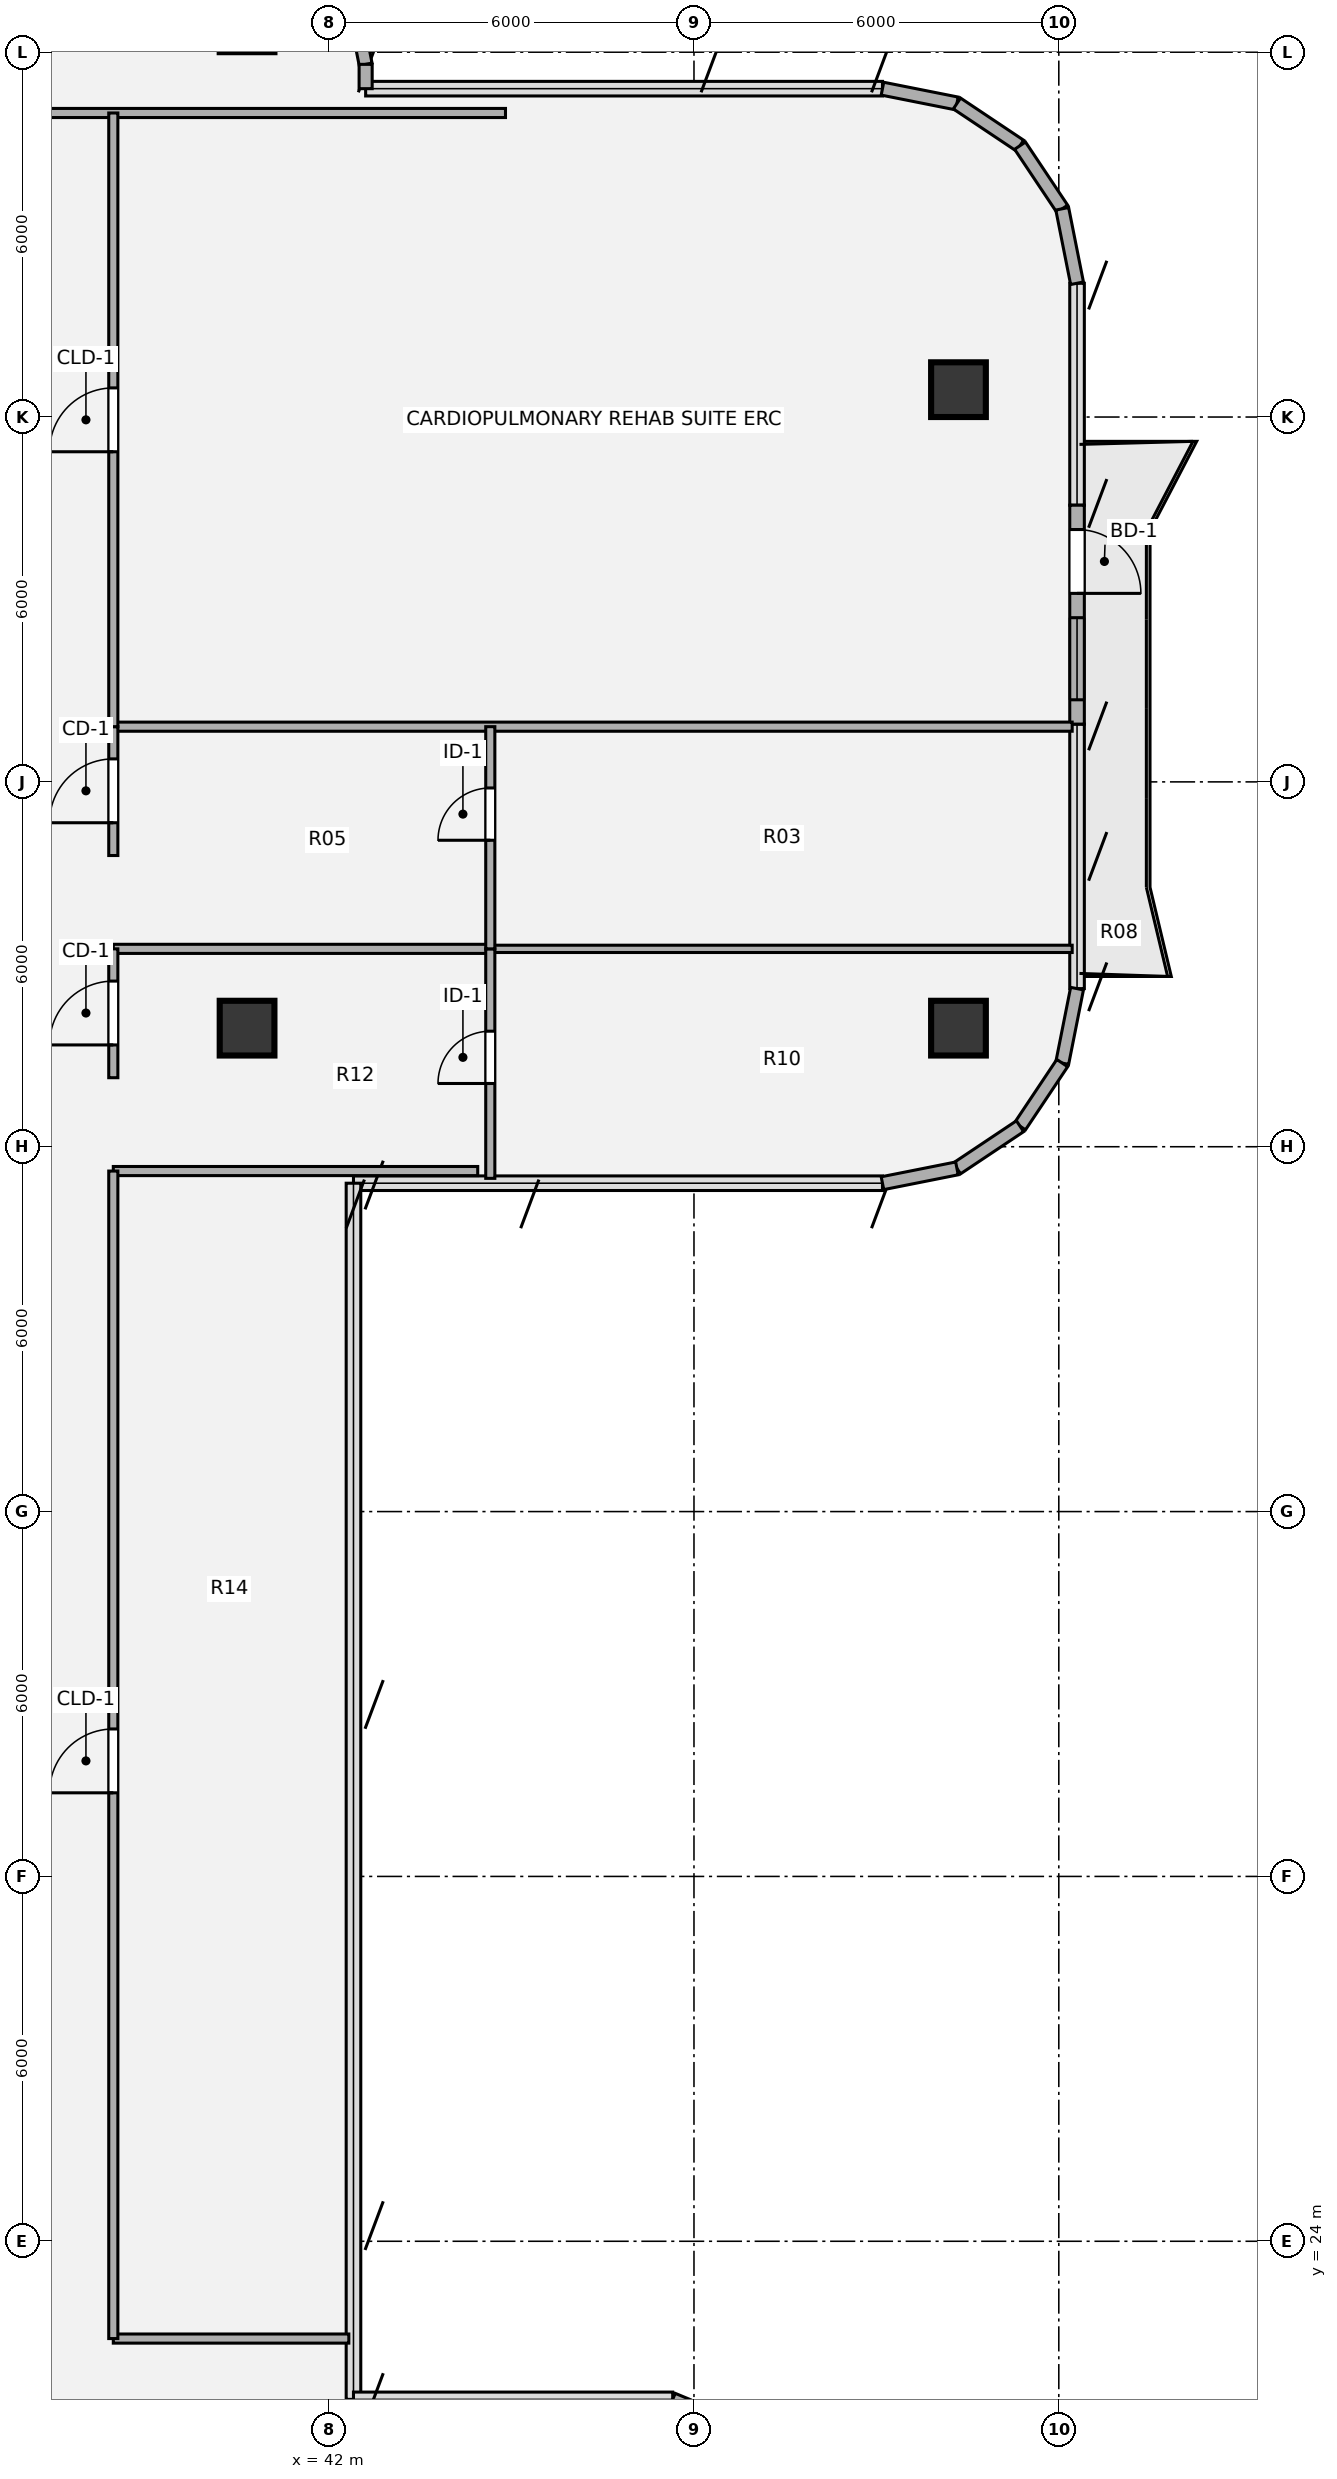
"""IFC4 building model, lengths in metres.
Left out: names, types, materials, properties, quantities, classifications, styles, units other than length and angle.
Written with IfcOpenShell. Run it as: python <this file> out.ifc"""

import sys

from ifc_helpers import new_model, si_unit, direction, frame, frame_2d, origin, origin_2d, place, context, subcontext, project, spatial, rectangle, hollow_circle, extrude, source, transform, mapped, element, fill, save


model = new_model("IFC4")
c1 = context("Model", 3, precision=1e-05, world=origin(), true_north=direction((0.0, 1.0)))
c2 = subcontext(c1, "Body", "Model", "MODEL_VIEW")
j1 = project(units=[si_unit("LENGTHUNIT", "METRE"), si_unit("PLANEANGLEUNIT", "RADIAN")], contexts=[c1])
p1 = place(None, origin())
s1 = spatial("IfcSite", under=j1, at=p1, CompositionType="ELEMENT")
p2 = place(p1, origin())
s2 = spatial("IfcBuilding", under=s1, at=p2, CompositionType="ELEMENT")
p3 = place(p2, frame((0.0, 0.0, 245.7)))
s3 = spatial("IfcBuildingStorey", under=s2, at=p3, CompositionType="ELEMENT", Elevation=245.7)
m1 = source(origin(), c2, "Body", "SweptSolid", [
    extrude(hollow_circle(Radius=0.45, WallThickness=0.032, at=origin_2d()), origin(), (0.0, 0.0, 1.0), 3.78),
])
for number, where, z_axis, x_axis in (
    (1, (52.35, 43.95, 0.0), (0.0, 0.0, 1.0), (1.0, 0.0, 0.0)),
    (2, (52.35, 54.45, 0.0), (0.0, 0.0, 1.0), (1.0, 0.0, 0.0)),
    (3, (40.65, 43.95, 0.0), (0.0, 0.0, 1.0), (1.0, 0.0, 0.0)),
):
    element("IfcColumn", number, at=place(p3, frame(where, z_axis=z_axis, x_axis=x_axis)), inside=s3, PredefinedType="COLUMN", context=c2, shape_type="MappedRepresentation", body=[
        mapped(m1, transform((0.0, 0.0, 0.0), x_axis=(1.0, 0.0, 0.0), y_axis=(0.0, 1.0, 0.0), z_axis=(0.0, 0.0, 1.0), scale=1.0)),
    ])
p4 = place(p3, frame((42.402, 60.795, 0.0), z_axis=(0.0, 0.0, 1.0), x_axis=(0.195190360752, -0.980765376158, 0.0)))
e4 = element("IfcWall", 4, at=p4, inside=s3, PredefinedType="SOLIDWALL", context=c2, shape_type="SweptSolid", body=[
    extrude(rectangle(XDim=1.014, YDim=0.215, at=frame_2d((0.507, 0.0))), origin(), (0.0, 0.0, 1.0), 3.53),
])
p5 = place(p3, frame((42.6, 59.8, 0.0), z_axis=(0.0, 0.0, 1.0), x_axis=(0.0, -1.0, 0.0)))
e5 = element("IfcWall", 5, at=p5, inside=s3, PredefinedType="SOLIDWALL", context=c2, shape_type="SweptSolid", body=[
    extrude(rectangle(XDim=0.4, YDim=0.215, at=frame_2d((0.2, 0.0))), origin(), (0.0, 0.0, 1.0), 3.53),
])
for number, where, z_axis, x_axis in (
    (6, (51.1, 59.4, 0.0), (0.0, 0.0, 1.0), (0.981, -0.195, 0.0)),
    (7, (52.325, 59.156, 0.0), (0.0, 0.0, 1.0), (0.831, -0.556, 0.0)),
    (8, (53.363, 58.463, 0.0), (0.0, 0.0, 1.0), (0.556, -0.831, 0.0)),
    (9, (54.056, 57.425, 0.0), (0.0, 0.0, 1.0), (0.195, -0.981, 0.0)),
):
    element("IfcWall", number, at=place(p3, frame(where, z_axis=z_axis, x_axis=x_axis)), inside=s3, PredefinedType="SOLIDWALL", context=c2, shape_type="SweptSolid", body=[
        extrude(rectangle(XDim=1.249, YDim=0.215, at=frame_2d((0.624, 0.0))), origin(), (0.0, 0.0, 1.0), 3.53),
    ])
p6 = place(p3, frame((54.3, 52.55, 0.0), z_axis=(0.0, 0.0, 1.0), x_axis=(0.0, -1.0, 0.0)))
e10 = element("IfcWall", 10, at=p6, inside=s3, PredefinedType="SOLIDWALL", context=c2, shape_type="SweptSolid", body=[
    extrude(rectangle(XDim=3.6, YDim=0.24, at=frame_2d((1.8, 0.0))), origin(), (0.0, 0.0, 1.0), 3.53),
])
p7 = place(p6, frame((0.4, 0.0, 0.0)))
e11 = element("IfcOpeningElement", 11, at=p7, cuts=e10, PredefinedType="OPENING", context=c2, shape_type="SweptSolid", body=[
    extrude(rectangle(XDim=1.05, YDim=2.15, at=origin_2d()), frame((0.525, 0.13, 1.075), z_axis=(0.0, -1.0, 0.0), x_axis=(1.0, 0.0, 0.0)), (0.0, 0.0, 1.0), 0.26),
])
p8 = place(p6, frame((1.85, 0.0, 0.85)))
e12 = element("IfcOpeningElement", 12, at=p8, cuts=e10, PredefinedType="OPENING", context=c2, shape_type="SweptSolid", body=[
    extrude(rectangle(XDim=1.35, YDim=1.35, at=origin_2d()), frame((0.675, 0.13, 0.675), z_axis=(0.0, -1.0, 0.0), x_axis=(1.0, 0.0, 0.0)), (0.0, 0.0, 1.0), 0.26),
])
for number, where, z_axis, x_axis in (
    (13, (54.3, 44.6, 0.0), (0.0, 0.0, 1.0), (-0.195, -0.981, 0.0)),
    (14, (54.056, 43.375, 0.0), (0.0, 0.0, 1.0), (-0.556, -0.831, 0.0)),
    (15, (53.363, 42.337, 0.0), (0.0, 0.0, 1.0), (-0.831, -0.556, 0.0)),
    (16, (52.325, 41.644, 0.0), (0.0, 0.0, 1.0), (-0.981, -0.195, 0.0)),
):
    element("IfcWall", number, at=place(p3, frame(where, z_axis=z_axis, x_axis=x_axis)), inside=s3, PredefinedType="SOLIDWALL", context=c2, shape_type="SweptSolid", body=[
        extrude(rectangle(XDim=1.249, YDim=0.215, at=frame_2d((0.624, 0.0))), origin(), (0.0, 0.0, 1.0), 3.53),
    ])
p9 = place(p3, frame((47.65, 21.4, 0.0), z_axis=(0.0, 0.0, 1.0), x_axis=(0.924205486139, -0.381895560841, 0.0)))
e17 = element("IfcWall", 17, at=p9, inside=s3, PredefinedType="SOLIDWALL", context=c2, shape_type="SweptSolid", body=[
    extrude(rectangle(XDim=0.268, YDim=0.215, at=frame_2d((0.134, 0.0))), origin(), (0.0, 0.0, 1.0), 3.53),
])
p10 = place(p3, frame((38.45, 22.4, 0.0), z_axis=(0.0, 0.0, 1.0), x_axis=(1.0, 0.0, 0.0)))
e18 = element("IfcWall", 18, at=p10, inside=s3, PredefinedType="PARTITIONING", context=c2, shape_type="SweptSolid", body=[
    extrude(rectangle(XDim=3.873, YDim=0.15, at=frame_2d((1.937, 0.0))), origin(), (0.0, 0.0, 1.0), 3.5),
])
p11 = place(p3, frame((38.45, 41.6, 0.0), z_axis=(0.0, 0.0, 1.0), x_axis=(1.0, 0.0, 0.0)))
e19 = element("IfcWall", 19, at=p11, inside=s3, PredefinedType="PARTITIONING", context=c2, shape_type="SweptSolid", body=[
    extrude(rectangle(XDim=5.993, YDim=0.15, at=frame_2d((2.997, 0.0))), origin(), (0.0, 0.0, 1.0), 3.5),
])
p12 = place(p3, frame((38.45, 45.254, 0.0), z_axis=(0.0, 0.0, 1.0), x_axis=(1.0, 0.0, 0.0)))
e20 = element("IfcWall", 20, at=p12, inside=s3, PredefinedType="PARTITIONING", context=c2, shape_type="SweptSolid", body=[
    extrude(rectangle(XDim=6.2, YDim=0.15, at=frame_2d((3.1, 0.0))), origin(), (0.0, 0.0, 1.0), 2.982),
])
p13 = place(p3, frame((44.65, 45.254, 0.0), z_axis=(0.0, 0.0, 1.0), x_axis=(1.0, 0.0, 0.0)))
e21 = element("IfcWall", 21, at=p13, inside=s3, PredefinedType="PARTITIONING", context=c2, shape_type="SweptSolid", body=[
    extrude(rectangle(XDim=9.57, YDim=0.12, at=frame_2d((4.785, 0.0))), origin(), (0.0, 0.0, 1.0), 2.982),
])
p14 = place(p3, frame((38.45, 48.908, 0.0), z_axis=(0.0, 0.0, 1.0), x_axis=(1.0, 0.0, 0.0)))
e22 = element("IfcWall", 22, at=p14, inside=s3, PredefinedType="PARTITIONING", context=c2, shape_type="SweptSolid", body=[
    extrude(rectangle(XDim=15.77, YDim=0.15, at=frame_2d((7.885, 0.0))), origin(), (0.0, 0.0, 1.0), 2.982),
])
p15 = place(p3, frame((27.1, 59.0, 0.0), z_axis=(0.0, 0.0, 1.0), x_axis=(1.0, 0.0, 0.0)))
e23 = element("IfcWall", 23, at=p15, inside=s3, PredefinedType="PARTITIONING", context=c2, shape_type="SweptSolid", body=[
    extrude(rectangle(XDim=17.8, YDim=0.15, at=frame_2d((8.9, 0.0))), origin(), (0.0, 0.0, 1.0), 3.308),
])
p16 = place(p15, frame((8.375, 0.0, 0.0)))
e24 = element("IfcOpeningElement", 24, at=p16, cuts=e23, PredefinedType="OPENING", context=c2, shape_type="SweptSolid", body=[
    extrude(rectangle(XDim=1.05, YDim=2.1, at=origin_2d()), frame((0.525, 0.085, 1.05), z_axis=(0.0, -1.0, 0.0), x_axis=(1.0, 0.0, 0.0)), (0.0, 0.0, 1.0), 0.17),
])
p17 = place(p3, frame((38.45, 22.4, 0.0), z_axis=(0.0, 0.0, 1.0), x_axis=(0.0, 1.0, 0.0)))
e25 = element("IfcWall", 25, at=p17, inside=s3, PredefinedType="PARTITIONING", context=c2, shape_type="SweptSolid", body=[
    extrude(rectangle(XDim=19.2, YDim=0.15, at=frame_2d((9.6, 0.0))), origin(), (0.0, 0.0, 1.0), 3.5),
])
p18 = place(p17, frame((8.975, 0.0, 0.0)))
e26 = element("IfcOpeningElement", 26, at=p18, cuts=e25, PredefinedType="OPENING", context=c2, shape_type="SweptSolid", body=[
    extrude(rectangle(XDim=1.05, YDim=2.1, at=origin_2d()), frame((0.525, 0.085, 1.05), z_axis=(0.0, -1.0, 0.0), x_axis=(1.0, 0.0, 0.0)), (0.0, 0.0, 1.0), 0.17),
])
p19 = place(p3, frame((38.45, 43.135, 0.0), z_axis=(0.0, 0.0, 1.0), x_axis=(0.0, 1.0, 0.0)))
e27 = element("IfcWall", 27, at=p19, inside=s3, PredefinedType="PARTITIONING", context=c2, shape_type="SweptSolid", body=[
    extrude(rectangle(XDim=2.119, YDim=0.15, at=frame_2d((1.06, 0.0))), origin(), (0.0, 0.0, 1.0), 3.5),
])
p20 = place(p19, frame((0.539, 0.0, 0.0)))
e28 = element("IfcOpeningElement", 28, at=p20, cuts=e27, PredefinedType="OPENING", context=c2, shape_type="SweptSolid", body=[
    extrude(rectangle(XDim=1.05, YDim=2.1, at=origin_2d()), frame((0.525, 0.085, 1.05), z_axis=(0.0, -1.0, 0.0), x_axis=(1.0, 0.0, 0.0)), (0.0, 0.0, 1.0), 0.17),
])
p21 = place(p3, frame((38.45, 46.789, 0.0), z_axis=(0.0, 0.0, 1.0), x_axis=(0.0, 1.0, 0.0)))
e29 = element("IfcWall", 29, at=p21, inside=s3, PredefinedType="PARTITIONING", context=c2, shape_type="SweptSolid", body=[
    extrude(rectangle(XDim=2.119, YDim=0.15, at=frame_2d((1.06, 0.0))), origin(), (0.0, 0.0, 1.0), 3.5),
])
p22 = place(p21, frame((0.539, 0.0, 0.0)))
e30 = element("IfcOpeningElement", 30, at=p22, cuts=e29, PredefinedType="OPENING", context=c2, shape_type="SweptSolid", body=[
    extrude(rectangle(XDim=1.05, YDim=2.1, at=origin_2d()), frame((0.525, 0.085, 1.05), z_axis=(0.0, -1.0, 0.0), x_axis=(1.0, 0.0, 0.0)), (0.0, 0.0, 1.0), 0.17),
])
p23 = place(p3, frame((38.45, 48.908, 0.0), z_axis=(0.0, 0.0, 1.0), x_axis=(0.0, 1.0, 0.0)))
e31 = element("IfcWall", 31, at=p23, inside=s3, PredefinedType="PARTITIONING", context=c2, shape_type="SweptSolid", body=[
    extrude(rectangle(XDim=10.092, YDim=0.15, at=frame_2d((5.046, 0.0))), origin(), (0.0, 0.0, 1.0), 3.5),
])
p24 = place(p23, frame((4.521, 0.0, 0.0)))
e32 = element("IfcOpeningElement", 32, at=p24, cuts=e31, PredefinedType="OPENING", context=c2, shape_type="SweptSolid", body=[
    extrude(rectangle(XDim=1.05, YDim=2.1, at=origin_2d()), frame((0.525, 0.085, 1.05), z_axis=(0.0, -1.0, 0.0), x_axis=(1.0, 0.0, 0.0)), (0.0, 0.0, 1.0), 0.17),
])
p25 = place(p3, frame((44.65, 41.48, 0.0), z_axis=(0.0, 0.0, 1.0), x_axis=(0.0, 1.0, 0.0)))
e33 = element("IfcWall", 33, at=p25, inside=s3, PredefinedType="PARTITIONING", context=c2, shape_type="SweptSolid", body=[
    extrude(rectangle(XDim=3.774, YDim=0.15, at=frame_2d((1.887, 0.0))), origin(), (0.0, 0.0, 1.0), 3.5),
])
p26 = place(p25, frame((1.56, 0.0, 0.0)))
e34 = element("IfcOpeningElement", 34, at=p26, cuts=e33, PredefinedType="OPENING", context=c2, shape_type="SweptSolid", body=[
    extrude(rectangle(XDim=0.86, YDim=2.1, at=origin_2d()), frame((0.43, 0.085, 1.05), z_axis=(0.0, -1.0, 0.0), x_axis=(1.0, 0.0, 0.0)), (0.0, 0.0, 1.0), 0.17),
])
p27 = place(p3, frame((44.65, 45.254, 0.0), z_axis=(0.0, 0.0, 1.0), x_axis=(0.0, 1.0, 0.0)))
e35 = element("IfcWall", 35, at=p27, inside=s3, PredefinedType="PARTITIONING", context=c2, shape_type="SweptSolid", body=[
    extrude(rectangle(XDim=3.654, YDim=0.15, at=frame_2d((1.827, 0.0))), origin(), (0.0, 0.0, 1.0), 3.5),
])
p28 = place(p27, frame((1.786, 0.0, 0.0)))
e36 = element("IfcOpeningElement", 36, at=p28, cuts=e35, PredefinedType="OPENING", context=c2, shape_type="SweptSolid", body=[
    extrude(rectangle(XDim=0.86, YDim=2.1, at=origin_2d()), frame((0.43, 0.085, 1.05), z_axis=(0.0, -1.0, 0.0), x_axis=(1.0, 0.0, 0.0)), (0.0, 0.0, 1.0), 0.17),
])
m2 = source(origin(), c2, "Body", "SweptSolid", [
    extrude(rectangle(XDim=1.05, YDim=2.15, at=origin_2d()), frame((0.525, 0.025, 1.075), z_axis=(0.0, -1.0, 0.0), x_axis=(1.0, 0.0, 0.0)), (0.0, 0.0, 1.0), 0.05),
])
p29 = place(p7, origin())
e37 = element("IfcDoor", 37, at=p29, inside=s3, OperationType="SINGLE_SWING_RIGHT", PredefinedType="DOOR", context=c2, shape_type="MappedRepresentation", body=[
    mapped(m2, transform((0.0, 0.0, 0.0), x_axis=(1.0, 0.0, 0.0), y_axis=(0.0, 1.0, 0.0), z_axis=(0.0, 0.0, 1.0), scale=1.0)),
])
fill(e11, e37)
m3 = source(origin(), c2, "Body", "SweptSolid", [
    extrude(rectangle(XDim=1.35, YDim=1.35, at=origin_2d()), frame((0.675, 0.03, 0.675), z_axis=(0.0, -1.0, 0.0), x_axis=(1.0, 0.0, 0.0)), (0.0, 0.0, 1.0), 0.06),
])
p30 = place(p8, origin())
e38 = element("IfcWindow", 38, at=p30, inside=s3, PartitioningType="SINGLE_PANEL", PredefinedType="WINDOW", context=c2, shape_type="MappedRepresentation", body=[
    mapped(m3, transform((0.0, 0.0, 0.0), x_axis=(1.0, 0.0, 0.0), y_axis=(0.0, 1.0, 0.0), z_axis=(0.0, 0.0, 1.0), scale=1.0)),
])
fill(e12, e38)
m4 = source(origin(), c2, "Body", "SweptSolid", [
    extrude(rectangle(XDim=1.05, YDim=2.1, at=origin_2d()), frame((0.525, 0.025, 1.05), z_axis=(0.0, -1.0, 0.0), x_axis=(1.0, 0.0, 0.0)), (0.0, 0.0, 1.0), 0.05),
])
p31 = place(p18, origin())
e39 = element("IfcDoor", 39, at=p31, inside=s3, OperationType="SINGLE_SWING_LEFT", PredefinedType="DOOR", context=c2, shape_type="MappedRepresentation", body=[
    mapped(m4, transform((0.0, 0.0, 0.0), x_axis=(1.0, 0.0, 0.0), y_axis=(0.0, 1.0, 0.0), z_axis=(0.0, 0.0, 1.0), scale=1.0)),
])
fill(e26, e39)
m5 = source(origin(), c2, "Body", "SweptSolid", [
    extrude(rectangle(XDim=1.05, YDim=2.1, at=origin_2d()), frame((0.525, 0.025, 1.05), z_axis=(0.0, -1.0, 0.0), x_axis=(1.0, 0.0, 0.0)), (0.0, 0.0, 1.0), 0.05),
])
p32 = place(p20, origin())
e40 = element("IfcDoor", 40, at=p32, inside=s3, OperationType="SINGLE_SWING_LEFT", PredefinedType="DOOR", context=c2, shape_type="MappedRepresentation", body=[
    mapped(m5, transform((0.0, 0.0, 0.0), x_axis=(1.0, 0.0, 0.0), y_axis=(0.0, 1.0, 0.0), z_axis=(0.0, 0.0, 1.0), scale=1.0)),
])
fill(e28, e40)
p33 = place(p22, origin())
e41 = element("IfcDoor", 41, at=p33, inside=s3, OperationType="SINGLE_SWING_LEFT", PredefinedType="DOOR", context=c2, shape_type="MappedRepresentation", body=[
    mapped(m5, transform((0.0, 0.0, 0.0), x_axis=(1.0, 0.0, 0.0), y_axis=(0.0, 1.0, 0.0), z_axis=(0.0, 0.0, 1.0), scale=1.0)),
])
fill(e30, e41)
p34 = place(p24, origin())
e42 = element("IfcDoor", 42, at=p34, inside=s3, OperationType="SINGLE_SWING_LEFT", PredefinedType="DOOR", context=c2, shape_type="MappedRepresentation", body=[
    mapped(m4, transform((0.0, 0.0, 0.0), x_axis=(1.0, 0.0, 0.0), y_axis=(0.0, 1.0, 0.0), z_axis=(0.0, 0.0, 1.0), scale=1.0)),
])
fill(e32, e42)
m6 = source(origin(), c2, "Body", "SweptSolid", [
    extrude(rectangle(XDim=0.86, YDim=2.1, at=origin_2d()), frame((0.43, 0.025, 1.05), z_axis=(0.0, -1.0, 0.0), x_axis=(1.0, 0.0, 0.0)), (0.0, 0.0, 1.0), 0.05),
])
p35 = place(p26, origin())
e43 = element("IfcDoor", 43, at=p35, inside=s3, OperationType="SINGLE_SWING_LEFT", PredefinedType="DOOR", context=c2, shape_type="MappedRepresentation", body=[
    mapped(m6, transform((0.0, 0.0, 0.0), x_axis=(1.0, 0.0, 0.0), y_axis=(0.0, 1.0, 0.0), z_axis=(0.0, 0.0, 1.0), scale=1.0)),
])
fill(e34, e43)
p36 = place(p28, origin())
e44 = element("IfcDoor", 44, at=p36, inside=s3, OperationType="SINGLE_SWING_LEFT", PredefinedType="DOOR", context=c2, shape_type="MappedRepresentation", body=[
    mapped(m6, transform((0.0, 0.0, 0.0), x_axis=(1.0, 0.0, 0.0), y_axis=(0.0, 1.0, 0.0), z_axis=(0.0, 0.0, 1.0), scale=1.0)),
])
fill(e36, e44)
save(model, sys.argv[1])
